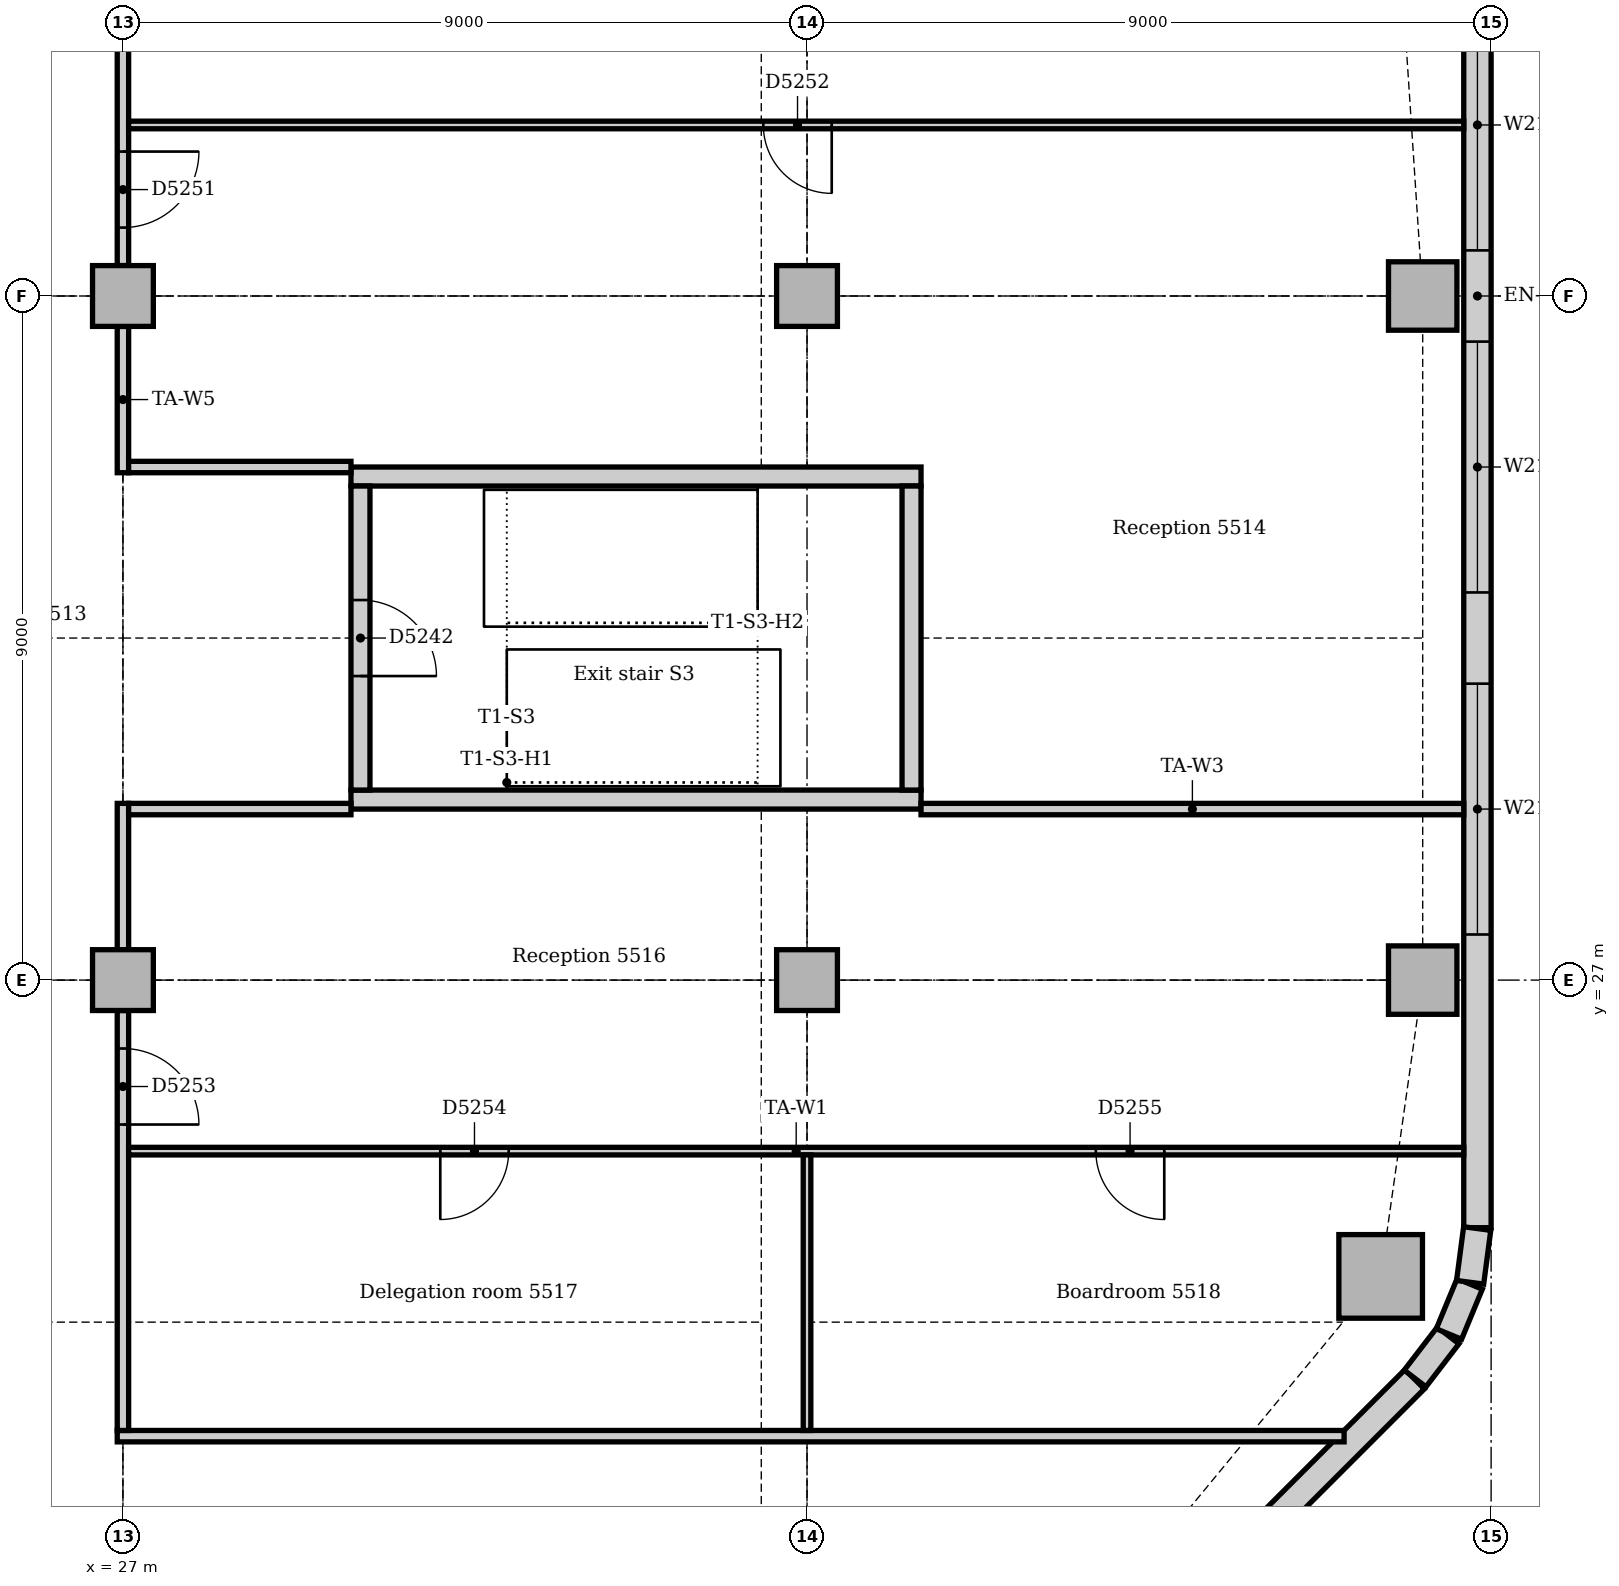
"""IFC4 building model, lengths in metres.
Left out: names, types, materials, properties, quantities, classifications, styles, units other than length and angle.
Written with IfcOpenShell. Run it as: python <this file> out.ifc"""

import sys

from ifc_helpers import new_model, si_unit, direction, frame, frame_2d, origin, origin_2d, place, context, subcontext, project, spatial, rectangle, extrude, element, fill, save


model = new_model("IFC4")
c1 = context("Model", 3, precision=1e-05, world=origin(), true_north=direction((0.0, 1.0)))
c2 = subcontext(c1, "Body", "Model", "MODEL_VIEW")
j1 = project(units=[si_unit("LENGTHUNIT", "METRE"), si_unit("PLANEANGLEUNIT", "RADIAN")], contexts=[c1])
p1 = place(None, origin())
s1 = spatial("IfcSite", under=j1, at=p1, CompositionType="ELEMENT")
p2 = place(p1, origin())
s2 = spatial("IfcBuilding", under=s1, at=p2, CompositionType="ELEMENT")
p3 = place(p2, frame((0.0, 0.0, 230.0)))
s3 = spatial("IfcBuildingStorey", under=s2, at=p3, CompositionType="ELEMENT", Elevation=230.0)
for number, where, z_axis, x_axis in (
    (1, (30.0, 29.375, 0.0), (0.0, 0.0, 1.0), (1.0, 0.0, 0.0)),
    (2, (37.5, 33.625, 0.0), (0.0, 0.0, 1.0), (-1.0, 0.0, 0.0)),
):
    element("IfcWall", number, at=place(p3, frame(where, z_axis=z_axis, x_axis=x_axis)), inside=s3, PredefinedType="SOLIDWALL", context=c2, shape_type="SweptSolid", body=[
        extrude(rectangle(XDim=7.5, YDim=0.25, at=frame_2d((3.75, 0.0))), origin(), (0.0, 0.0, 1.0), 4.0),
    ])
p4 = place(p3, frame((37.375, 29.5, 0.0), z_axis=(0.0, 0.0, 1.0), x_axis=(0.0, 1.0, 0.0)))
e3 = element("IfcWall", 3, at=p4, inside=s3, PredefinedType="SOLIDWALL", context=c2, shape_type="SweptSolid", body=[
    extrude(rectangle(XDim=4.0, YDim=0.25, at=frame_2d((2.0, 0.0))), origin(), (0.0, 0.0, 1.0), 4.0),
])
p5 = place(p3, frame((30.125, 33.5, 0.0), z_axis=(0.0, 0.0, 1.0), x_axis=(0.0, -1.0, 0.0)))
e4 = element("IfcWall", 4, at=p5, inside=s3, PredefinedType="SOLIDWALL", context=c2, shape_type="SweptSolid", body=[
    extrude(rectangle(XDim=4.0, YDim=0.25, at=frame_2d((2.0, 0.0))), origin(), (0.0, 0.0, 1.0), 4.0),
])
p6 = place(p5, frame((1.5, 0.0, 0.0)))
e5 = element("IfcOpeningElement", 5, at=p6, cuts=e4, PredefinedType="OPENING", context=c2, shape_type="SweptSolid", body=[
    extrude(rectangle(XDim=1.0, YDim=2.1, at=frame_2d((0.5, 1.05))), frame((0.0, 0.135, 0.0), z_axis=(0.0, -1.0, 0.0), x_axis=(1.0, 0.0, 0.0)), (0.0, 0.0, 1.0), 0.27),
])
p7 = place(p3, frame((43.547, 23.102, 0.0), z_axis=(0.0, 0.0, 1.0), x_axis=(1.0, 0.0, 0.0)))
e6 = element("IfcColumn", 6, at=p7, inside=s3, PredefinedType="COLUMN", context=c2, shape_type="SweptSolid", body=[
    extrude(rectangle(XDim=1.1, YDim=1.1, at=origin_2d()), origin(), (0.0, 0.0, 1.0), 3.85),
])
for number, where, z_axis, x_axis in (
    (7, (44.1, 27.0, 0.0), (0.0, 0.0, 1.0), (1.0, 0.0, 0.0)),
    (8, (44.1, 36.0, 0.0), (0.0, 0.0, 1.0), (1.0, 0.0, 0.0)),
):
    element("IfcColumn", number, at=place(p3, frame(where, z_axis=z_axis, x_axis=x_axis)), inside=s3, PredefinedType="COLUMN", context=c2, shape_type="SweptSolid", body=[
        extrude(rectangle(XDim=0.9, YDim=0.9, at=origin_2d()), origin(), (0.0, 0.0, 1.0), 3.85),
    ])
for number, where, z_axis, x_axis in (
    (9, (27.0, 27.0, 0.0), (0.0, 0.0, 1.0), (1.0, 0.0, 0.0)),
    (10, (27.0, 36.0, 0.0), (0.0, 0.0, 1.0), (1.0, 0.0, 0.0)),
    (11, (36.0, 27.0, 0.0), (0.0, 0.0, 1.0), (1.0, 0.0, 0.0)),
    (12, (36.0, 36.0, 0.0), (0.0, 0.0, 1.0), (1.0, 0.0, 0.0)),
):
    element("IfcColumn", number, at=place(p3, frame(where, z_axis=z_axis, x_axis=x_axis)), inside=s3, PredefinedType="COLUMN", context=c2, shape_type="SweptSolid", body=[
        extrude(rectangle(XDim=0.8, YDim=0.8, at=origin_2d()), origin(), (0.0, 0.0, 1.0), 3.85),
    ])
p8 = place(p3, frame((36.751, 14.506, 0.0), z_axis=(0.0, 0.0, 1.0), x_axis=(0.707106781187, 0.707106781187, 0.0)))
e13 = element("IfcWall", 13, at=p8, inside=s3, PredefinedType="STANDARD", context=c2, shape_type="SweptSolid", body=[
    extrude(rectangle(XDim=10.243, YDim=0.36, at=frame_2d((5.121, 0.0))), origin(), (0.0, 0.0, 1.0), 3.85),
])
p9 = place(p8, frame((5.021, 0.0, 0.9)))
e14 = element("IfcOpeningElement", 14, at=p9, cuts=e13, PredefinedType="OPENING", context=c2, shape_type="SweptSolid", body=[
    extrude(rectangle(XDim=1.8, YDim=1.6, at=frame_2d((0.9, 0.8))), frame((0.0, 0.19, 0.0), z_axis=(0.0, -1.0, 0.0), x_axis=(1.0, 0.0, 0.0)), (0.0, 0.0, 1.0), 0.38),
])
p10 = place(p3, frame((44.82, 23.743, 0.0), z_axis=(0.0, 0.0, 1.0), x_axis=(0.0, 1.0, 0.0)))
e15 = element("IfcWall", 15, at=p10, inside=s3, PredefinedType="STANDARD", context=c2, shape_type="SweptSolid", body=[
    extrude(rectangle(XDim=24.515, YDim=0.36, at=frame_2d((12.257, 0.0))), origin(), (0.0, 0.0, 1.0), 3.85),
])
p11 = place(p10, frame((3.857, 0.0, 0.9)))
e16 = element("IfcOpeningElement", 16, at=p11, cuts=e15, PredefinedType="OPENING", context=c2, shape_type="SweptSolid", body=[
    extrude(rectangle(XDim=3.3, YDim=1.6, at=frame_2d((1.65, 0.8))), frame((0.0, 0.19, 0.0), z_axis=(0.0, -1.0, 0.0), x_axis=(1.0, 0.0, 0.0)), (0.0, 0.0, 1.0), 0.38),
])
p12 = place(p10, frame((8.357, 0.0, 0.9)))
e17 = element("IfcOpeningElement", 17, at=p12, cuts=e15, PredefinedType="OPENING", context=c2, shape_type="SweptSolid", body=[
    extrude(rectangle(XDim=3.3, YDim=1.6, at=frame_2d((1.65, 0.8))), frame((0.0, 0.19, 0.0), z_axis=(0.0, -1.0, 0.0), x_axis=(1.0, 0.0, 0.0)), (0.0, 0.0, 1.0), 0.38),
])
p13 = place(p10, frame((12.857, 0.0, 0.9)))
e18 = element("IfcOpeningElement", 18, at=p13, cuts=e15, PredefinedType="OPENING", context=c2, shape_type="SweptSolid", body=[
    extrude(rectangle(XDim=3.3, YDim=1.6, at=frame_2d((1.65, 0.8))), frame((0.0, 0.19, 0.0), z_axis=(0.0, -1.0, 0.0), x_axis=(1.0, 0.0, 0.0)), (0.0, 0.0, 1.0), 0.38),
])
p14 = place(p10, frame((17.357, 0.0, 0.9)))
e19 = element("IfcOpeningElement", 19, at=p14, cuts=e15, PredefinedType="OPENING", context=c2, shape_type="SweptSolid", body=[
    extrude(rectangle(XDim=3.3, YDim=1.6, at=frame_2d((1.65, 0.8))), frame((0.0, 0.19, 0.0), z_axis=(0.0, -1.0, 0.0), x_axis=(1.0, 0.0, 0.0)), (0.0, 0.0, 1.0), 0.38),
])
p15 = place(p3, frame((44.0, 21.759, 0.0), z_axis=(0.0, 0.0, 1.0), x_axis=(0.608802368033, 0.793321924995, 0.0)))
e20 = element("IfcWall", 20, at=p15, inside=s3, PredefinedType="STANDARD", context=c2, shape_type="SweptSolid", body=[
    extrude(rectangle(XDim=0.713, YDim=0.36, at=frame_2d((0.357, 0.0))), origin(), (0.0, 0.0, 1.0), 3.85),
])
for number, where, z_axis, x_axis in (
    (21, (44.445, 22.344, 0.0), (0.0, 0.0, 1.0), (0.383, 0.924, 0.0)),
    (22, (44.724, 23.024, 0.0), (0.0, 0.0, 1.0), (0.131, 0.991, 0.0)),
):
    element("IfcWall", number, at=place(p3, frame(where, z_axis=z_axis, x_axis=x_axis)), inside=s3, PredefinedType="STANDARD", context=c2, shape_type="SweptSolid", body=[
        extrude(rectangle(XDim=0.713, YDim=0.36, at=frame_2d((0.356, 0.0))), origin(), (0.0, 0.0, 1.0), 3.85),
    ])
p16 = place(p3, frame((26.925, 21.0, 0.0), z_axis=(0.0, 0.0, 1.0), x_axis=(1.0, 0.0, 0.0)))
e23 = element("IfcWall", 23, at=p16, inside=s3, PredefinedType="PARTITIONING", context=c2, shape_type="SweptSolid", body=[
    extrude(rectangle(XDim=16.141, YDim=0.15, at=frame_2d((8.07, 0.0))), origin(), (0.0, 0.0, 1.0), 3.85),
])
p17 = place(p3, frame((27.0, 33.675, 0.0), z_axis=(0.0, 0.0, 1.0), x_axis=(0.0, 1.0, 0.0)))
e24 = element("IfcWall", 24, at=p17, inside=s3, PredefinedType="PARTITIONING", context=c2, shape_type="SweptSolid", body=[
    extrude(rectangle(XDim=1.925, YDim=0.15, at=frame_2d((0.963, 0.0))), origin(), (0.0, 0.0, 1.0), 3.35),
])
p18 = place(p3, frame((27.0, 36.4, 0.0), z_axis=(0.0, 0.0, 1.0), x_axis=(0.0, 1.0, 0.0)))
e25 = element("IfcWall", 25, at=p18, inside=s3, PredefinedType="PARTITIONING", context=c2, shape_type="SweptSolid", body=[
    extrude(rectangle(XDim=7.3, YDim=0.15, at=frame_2d((3.65, 0.0))), origin(), (0.0, 0.0, 1.0), 3.35),
])
p19 = place(p18, frame((0.5, 0.0, 0.0)))
e26 = element("IfcOpeningElement", 26, at=p19, cuts=e25, PredefinedType="OPENING", context=c2, shape_type="SweptSolid", body=[
    extrude(rectangle(XDim=1.0, YDim=2.1, at=frame_2d((0.5, 1.05))), frame((0.0, 0.085, 0.0), z_axis=(0.0, -1.0, 0.0), x_axis=(1.0, 0.0, 0.0)), (0.0, 0.0, 1.0), 0.17),
])
p20 = place(p3, frame((27.0, 21.075, 0.0), z_axis=(0.0, 0.0, 1.0), x_axis=(0.0, 1.0, 0.0)))
e27 = element("IfcWall", 27, at=p20, inside=s3, PredefinedType="PARTITIONING", context=c2, shape_type="SweptSolid", body=[
    extrude(rectangle(XDim=5.525, YDim=0.15, at=frame_2d((2.763, 0.0))), origin(), (0.0, 0.0, 1.0), 3.35),
])
p21 = place(p20, frame((4.025, 0.0, 0.0)))
e28 = element("IfcOpeningElement", 28, at=p21, cuts=e27, PredefinedType="OPENING", context=c2, shape_type="SweptSolid", body=[
    extrude(rectangle(XDim=1.0, YDim=2.1, at=frame_2d((0.5, 1.05))), frame((0.0, 0.085, 0.0), z_axis=(0.0, -1.0, 0.0), x_axis=(1.0, 0.0, 0.0)), (0.0, 0.0, 1.0), 0.17),
])
p22 = place(p3, frame((27.0, 27.4, 0.0), z_axis=(0.0, 0.0, 1.0), x_axis=(0.0, 1.0, 0.0)))
e29 = element("IfcWall", 29, at=p22, inside=s3, PredefinedType="PARTITIONING", context=c2, shape_type="SweptSolid", body=[
    extrude(rectangle(XDim=1.925, YDim=0.15, at=frame_2d((0.963, 0.0))), origin(), (0.0, 0.0, 1.0), 3.35),
])
for number, where, z_axis, x_axis in (
    (30, (27.075, 29.25, 0.0), (0.0, 0.0, 1.0), (1.0, 0.0, 0.0)),
    (31, (27.075, 33.75, 0.0), (0.0, 0.0, 1.0), (1.0, 0.0, 0.0)),
):
    element("IfcWall", number, at=place(p3, frame(where, z_axis=z_axis, x_axis=x_axis)), inside=s3, PredefinedType="PARTITIONING", context=c2, shape_type="SweptSolid", body=[
        extrude(rectangle(XDim=2.925, YDim=0.15, at=frame_2d((1.462, 0.0))), origin(), (0.0, 0.0, 1.0), 3.85),
    ])
p23 = place(p3, frame((37.5, 29.25, 0.0), z_axis=(0.0, 0.0, 1.0), x_axis=(1.0, 0.0, 0.0)))
e32 = element("IfcWall", 32, at=p23, inside=s3, PredefinedType="PARTITIONING", context=c2, shape_type="SweptSolid", body=[
    extrude(rectangle(XDim=7.14, YDim=0.15, at=frame_2d((3.57, 0.0))), origin(), (0.0, 0.0, 1.0), 3.85),
])
p24 = place(p3, frame((27.075, 24.75, 0.0), z_axis=(0.0, 0.0, 1.0), x_axis=(1.0, 0.0, 0.0)))
e33 = element("IfcWall", 33, at=p24, inside=s3, PredefinedType="PARTITIONING", context=c2, shape_type="SweptSolid", body=[
    extrude(rectangle(XDim=17.565, YDim=0.1, at=frame_2d((8.783, 0.0))), origin(), (0.0, 0.0, 1.0), 3.85),
])
p25 = place(p24, frame((4.1, 0.0, 0.0)))
e34 = element("IfcOpeningElement", 34, at=p25, cuts=e33, PredefinedType="OPENING", context=c2, shape_type="SweptSolid", body=[
    extrude(rectangle(XDim=0.9, YDim=2.1, at=frame_2d((0.45, 1.05))), frame((0.0, 0.06, 0.0), z_axis=(0.0, -1.0, 0.0), x_axis=(1.0, 0.0, 0.0)), (0.0, 0.0, 1.0), 0.12),
])
p26 = place(p24, frame((12.725, 0.0, 0.0)))
e35 = element("IfcOpeningElement", 35, at=p26, cuts=e33, PredefinedType="OPENING", context=c2, shape_type="SweptSolid", body=[
    extrude(rectangle(XDim=0.9, YDim=2.1, at=frame_2d((0.45, 1.05))), frame((0.0, 0.06, 0.0), z_axis=(0.0, -1.0, 0.0), x_axis=(1.0, 0.0, 0.0)), (0.0, 0.0, 1.0), 0.12),
])
p27 = place(p3, frame((27.075, 38.25, 0.0), z_axis=(0.0, 0.0, 1.0), x_axis=(1.0, 0.0, 0.0)))
e36 = element("IfcWall", 36, at=p27, inside=s3, PredefinedType="PARTITIONING", context=c2, shape_type="SweptSolid", body=[
    extrude(rectangle(XDim=17.565, YDim=0.1, at=frame_2d((8.783, 0.0))), origin(), (0.0, 0.0, 1.0), 3.85),
])
p28 = place(p27, frame((8.35, 0.0, 0.0)))
e37 = element("IfcOpeningElement", 37, at=p28, cuts=e36, PredefinedType="OPENING", context=c2, shape_type="SweptSolid", body=[
    extrude(rectangle(XDim=0.9, YDim=2.1, at=frame_2d((0.45, 1.05))), frame((0.0, 0.06, 0.0), z_axis=(0.0, -1.0, 0.0), x_axis=(1.0, 0.0, 0.0)), (0.0, 0.0, 1.0), 0.12),
])
p29 = place(p3, frame((36.0, 21.075, 0.0), z_axis=(0.0, 0.0, 1.0), x_axis=(0.0, 1.0, 0.0)))
e38 = element("IfcWall", 38, at=p29, inside=s3, PredefinedType="PARTITIONING", context=c2, shape_type="SweptSolid", body=[
    extrude(rectangle(XDim=3.625, YDim=0.1, at=frame_2d((1.812, 0.0))), origin(), (0.0, 0.0, 1.0), 3.35),
])
p30 = place(p11, origin())
e39 = element("IfcWindow", 39, at=p30, inside=s3, PartitioningType="SINGLE_PANEL", PredefinedType="WINDOW", context=c2, shape_type="SweptSolid", body=[
    extrude(rectangle(XDim=3.3, YDim=1.6, at=frame_2d((1.65, 0.8))), frame((0.0, 0.13, 0.0), z_axis=(0.0, -1.0, 0.0), x_axis=(1.0, 0.0, 0.0)), (0.0, 0.0, 1.0), 0.06),
])
fill(e16, e39)
p31 = place(p12, origin())
e40 = element("IfcWindow", 40, at=p31, inside=s3, PartitioningType="SINGLE_PANEL", PredefinedType="WINDOW", context=c2, shape_type="SweptSolid", body=[
    extrude(rectangle(XDim=3.3, YDim=1.6, at=frame_2d((1.65, 0.8))), frame((0.0, 0.13, 0.0), z_axis=(0.0, -1.0, 0.0), x_axis=(1.0, 0.0, 0.0)), (0.0, 0.0, 1.0), 0.06),
])
fill(e17, e40)
p32 = place(p13, origin())
e41 = element("IfcWindow", 41, at=p32, inside=s3, PartitioningType="SINGLE_PANEL", PredefinedType="WINDOW", context=c2, shape_type="SweptSolid", body=[
    extrude(rectangle(XDim=3.3, YDim=1.6, at=frame_2d((1.65, 0.8))), frame((0.0, 0.13, 0.0), z_axis=(0.0, -1.0, 0.0), x_axis=(1.0, 0.0, 0.0)), (0.0, 0.0, 1.0), 0.06),
])
fill(e18, e41)
p33 = place(p6, origin())
e42 = element("IfcDoor", 42, at=p33, inside=s3, OperationType="SINGLE_SWING_RIGHT", PredefinedType="DOOR", context=c2, shape_type="SweptSolid", body=[
    extrude(rectangle(XDim=1.0, YDim=2.1, at=frame_2d((0.5, 1.05))), frame((0.0, 0.025, 0.0), z_axis=(0.0, -1.0, 0.0), x_axis=(1.0, 0.0, 0.0)), (0.0, 0.0, 1.0), 0.05),
])
fill(e5, e42)
p34 = place(p19, frame((1.0, 0.0, 0.0), z_axis=(0.0, 0.0, 1.0), x_axis=(-1.0, 0.0, 0.0)))
e43 = element("IfcDoor", 43, at=p34, inside=s3, OperationType="SINGLE_SWING_LEFT", PredefinedType="DOOR", context=c2, shape_type="SweptSolid", body=[
    extrude(rectangle(XDim=1.0, YDim=2.1, at=frame_2d((0.5, 1.05))), frame((0.0, 0.025, 0.0), z_axis=(0.0, -1.0, 0.0), x_axis=(1.0, 0.0, 0.0)), (0.0, 0.0, 1.0), 0.05),
])
fill(e26, e43)
p35 = place(p28, frame((0.9, 0.0, 0.0), z_axis=(0.0, 0.0, 1.0), x_axis=(-1.0, 0.0, 0.0)))
e44 = element("IfcDoor", 44, at=p35, inside=s3, OperationType="SINGLE_SWING_LEFT", PredefinedType="DOOR", context=c2, shape_type="SweptSolid", body=[
    extrude(rectangle(XDim=0.9, YDim=2.1, at=frame_2d((0.45, 1.05))), frame((0.0, 0.025, 0.0), z_axis=(0.0, -1.0, 0.0), x_axis=(1.0, 0.0, 0.0)), (0.0, 0.0, 1.0), 0.05),
])
fill(e37, e44)
p36 = place(p21, frame((1.0, 0.0, 0.0), z_axis=(0.0, 0.0, 1.0), x_axis=(-1.0, 0.0, 0.0)))
e45 = element("IfcDoor", 45, at=p36, inside=s3, OperationType="SINGLE_SWING_RIGHT", PredefinedType="DOOR", context=c2, shape_type="SweptSolid", body=[
    extrude(rectangle(XDim=1.0, YDim=2.1, at=frame_2d((0.5, 1.05))), frame((0.0, 0.025, 0.0), z_axis=(0.0, -1.0, 0.0), x_axis=(1.0, 0.0, 0.0)), (0.0, 0.0, 1.0), 0.05),
])
fill(e28, e45)
p37 = place(p25, frame((0.9, 0.0, 0.0), z_axis=(0.0, 0.0, 1.0), x_axis=(-1.0, 0.0, 0.0)))
e46 = element("IfcDoor", 46, at=p37, inside=s3, OperationType="SINGLE_SWING_RIGHT", PredefinedType="DOOR", context=c2, shape_type="SweptSolid", body=[
    extrude(rectangle(XDim=0.9, YDim=2.1, at=frame_2d((0.45, 1.05))), frame((0.0, 0.025, 0.0), z_axis=(0.0, -1.0, 0.0), x_axis=(1.0, 0.0, 0.0)), (0.0, 0.0, 1.0), 0.05),
])
fill(e34, e46)
p38 = place(p26, frame((0.9, 0.0, 0.0), z_axis=(0.0, 0.0, 1.0), x_axis=(-1.0, 0.0, 0.0)))
e47 = element("IfcDoor", 47, at=p38, inside=s3, OperationType="SINGLE_SWING_LEFT", PredefinedType="DOOR", context=c2, shape_type="SweptSolid", body=[
    extrude(rectangle(XDim=0.9, YDim=2.1, at=frame_2d((0.45, 1.05))), frame((0.0, 0.025, 0.0), z_axis=(0.0, -1.0, 0.0), x_axis=(1.0, 0.0, 0.0)), (0.0, 0.0, 1.0), 0.05),
])
fill(e35, e47)
save(model, sys.argv[1])
